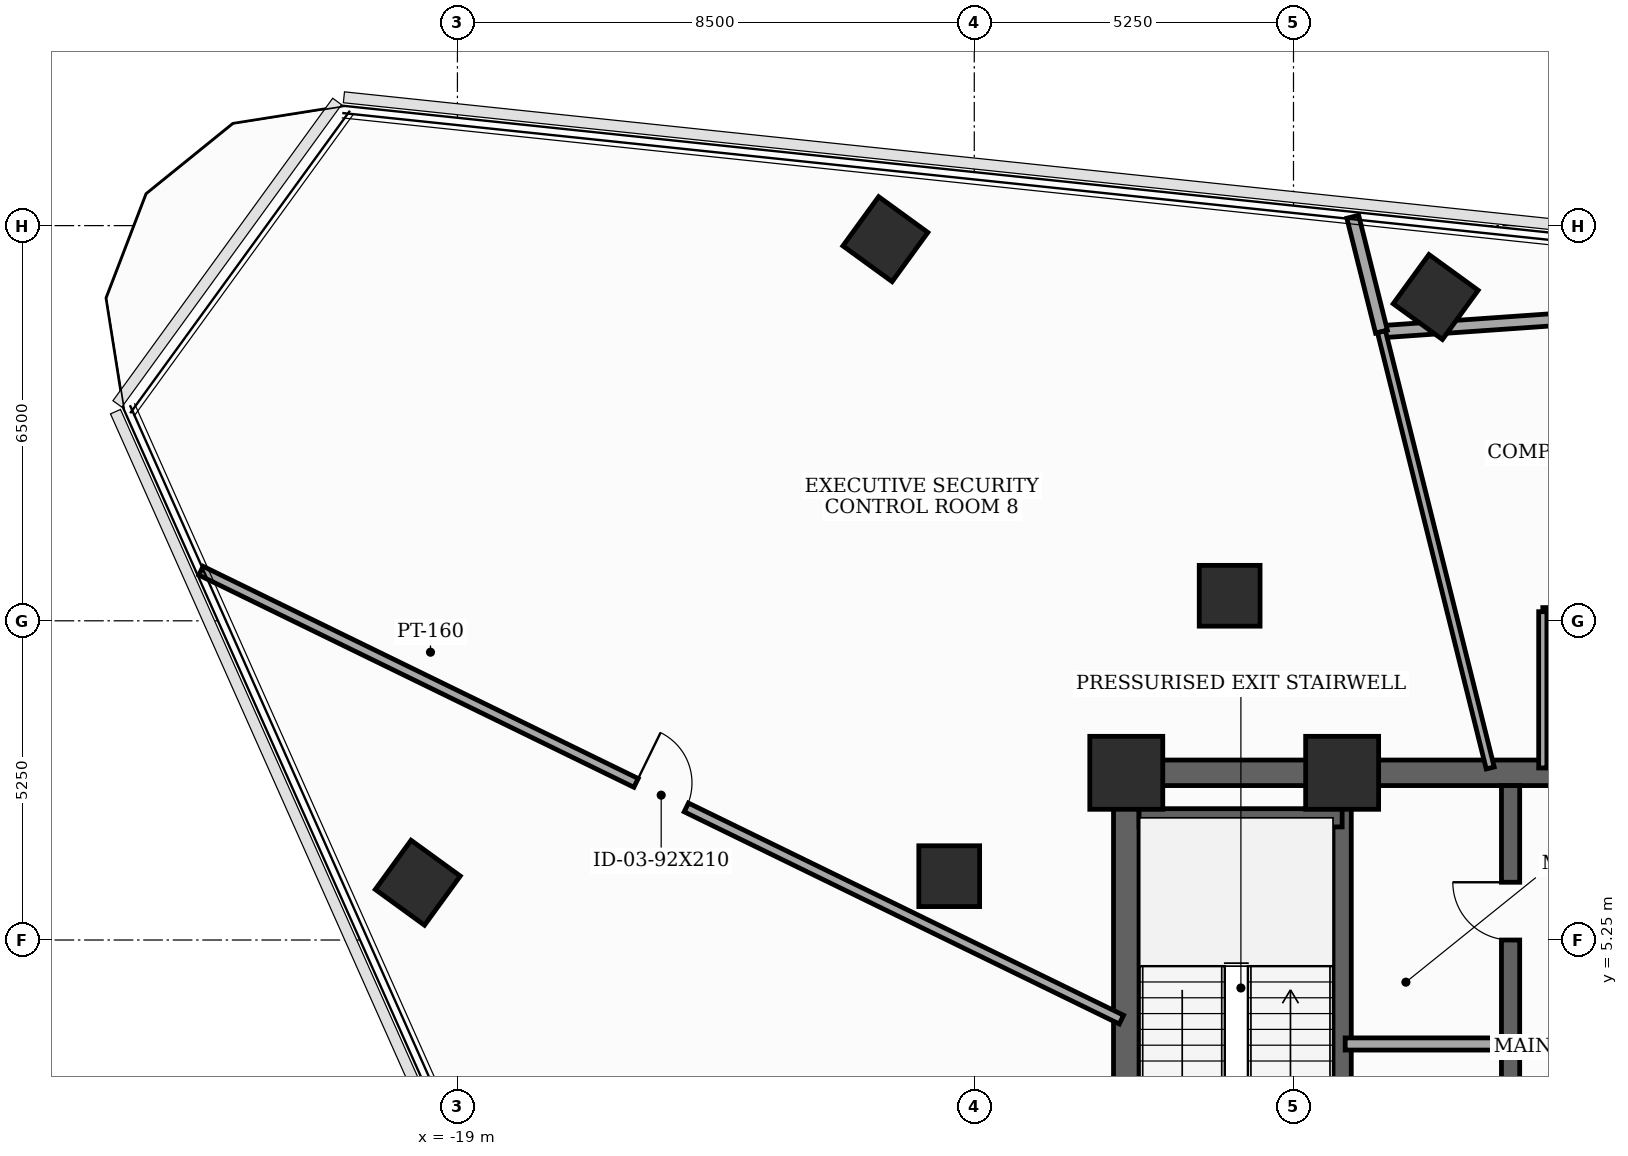
"""IFC4 building model, lengths in metres.
Left out: names, types, materials, properties, quantities, classifications, styles, units other than length and angle.
Written with IfcOpenShell. Run it as: python <this file> out.ifc"""

import sys

from ifc_helpers import new_model, si_unit, direction, frame, frame_2d, origin, origin_2d, place, context, subcontext, project, spatial, rectangle, extrude, element, fill, save


model = new_model("IFC4")
c1 = context("Model", 3, precision=1e-05, world=origin(), true_north=direction((0.0, 1.0)))
c2 = subcontext(c1, "Body", "Model", "MODEL_VIEW")
j1 = project(units=[si_unit("LENGTHUNIT", "METRE"), si_unit("PLANEANGLEUNIT", "RADIAN")], contexts=[c1])
p1 = place(None, origin())
s1 = spatial("IfcSite", under=j1, at=p1, CompositionType="ELEMENT")
p2 = place(p1, origin())
s2 = spatial("IfcBuilding", under=s1, at=p2, CompositionType="ELEMENT")
p3 = place(p2, frame((0.0, 0.0, 226.3)))
s3 = spatial("IfcBuildingStorey", under=s2, at=p3, CompositionType="ELEMENT", Elevation=226.3)
for number, where, z_axis, x_axis in (
    (1, (-4.45, 8.0, 0.0), (0.0, 0.0, 1.0), (1.0, 0.0, 0.0)),
    (2, (-8.0, 8.0, 0.0), (0.0, 0.0, 1.0), (1.0, 0.0, 0.0)),
):
    element("IfcColumn", number, at=place(p3, frame(where, z_axis=z_axis, x_axis=x_axis)), inside=s3, PredefinedType="COLUMN", context=c2, shape_type="SweptSolid", body=[
        extrude(rectangle(XDim=1.2, YDim=1.2, at=origin_2d()), origin(), (0.0, 0.0, 1.0), 3.7),
    ])
for number, where, z_axis, x_axis in (
    (3, (-6.3, 10.912, 0.0), (0.0, 0.0, 1.0), (1.0, 0.0, 0.0)),
    (4, (-10.912, 6.3, 0.0), (0.0, 0.0, 1.0), (1.0, 0.0, 0.0)),
    (5, (-2.912, 15.826, 0.0), (0.0, 0.0, 1.0), (0.588, 0.809, 0.0)),
    (6, (-11.962, 16.777, 0.0), (0.0, 0.0, 1.0), (0.588, 0.809, 0.0)),
    (7, (-19.652, 6.192, 0.0), (0.0, 0.0, 1.0), (0.588, 0.809, 0.0)),
):
    element("IfcColumn", number, at=place(p3, frame(where, z_axis=z_axis, x_axis=x_axis)), inside=s3, PredefinedType="COLUMN", context=c2, shape_type="SweptSolid", body=[
        extrude(rectangle(XDim=1.0, YDim=1.0, at=origin_2d()), origin(), (0.0, 0.0, 1.0), 3.7),
    ])
p4 = place(p3, frame((-8.0, -8.0, 0.0), z_axis=(0.0, 0.0, 1.0), x_axis=(0.0, 1.0, 0.0)))
e8 = element("IfcWall", 8, at=p4, inside=s3, PredefinedType="SHEAR", context=c2, shape_type="SweptSolid", body=[
    extrude(rectangle(XDim=16.0, YDim=0.42, at=frame_2d((8.0, 0.0))), origin(), (0.0, 0.0, 1.0), 3.5),
])
p5 = place(p4, frame((0.761, 0.0, 0.0)))
e9 = element("IfcOpeningElement", 9, at=p5, cuts=e8, PredefinedType="OPENING", context=c2, shape_type="SweptSolid", body=[
    extrude(rectangle(XDim=0.85, YDim=2.02, at=frame_2d((0.425, 1.01))), frame((0.0, 0.22, 0.0), z_axis=(0.0, -1.0, 0.0), x_axis=(1.0, 0.0, 0.0)), (0.0, 0.0, 1.0), 0.44),
])
p6 = place(p4, frame((5.35, 0.0, 0.0)))
e10 = element("IfcOpeningElement", 10, at=p6, cuts=e8, PredefinedType="OPENING", context=c2, shape_type="SweptSolid", body=[
    extrude(rectangle(XDim=1.05, YDim=2.15, at=frame_2d((0.525, 1.075))), frame((0.0, 0.22, 0.0), z_axis=(0.0, -1.0, 0.0), x_axis=(1.0, 0.0, 0.0)), (0.0, 0.0, 1.0), 0.44),
])
p7 = place(p3, frame((-8.0, 8.0, 0.0), z_axis=(0.0, 0.0, 1.0), x_axis=(1.0, 0.0, 0.0)))
e11 = element("IfcWall", 11, at=p7, inside=s3, PredefinedType="SHEAR", context=c2, shape_type="SweptSolid", body=[
    extrude(rectangle(XDim=16.0, YDim=0.42, at=frame_2d((8.0, 0.0))), origin(), (0.0, 0.0, 1.0), 3.5),
])
p8 = place(p7, frame((7.1, 0.0, 0.0)))
e12 = element("IfcOpeningElement", 12, at=p8, cuts=e11, PredefinedType="OPENING", context=c2, shape_type="SweptSolid", body=[
    extrude(rectangle(XDim=1.8, YDim=2.15, at=frame_2d((0.9, 1.075))), frame((0.0, 0.22, 0.0), z_axis=(0.0, -1.0, 0.0), x_axis=(1.0, 0.0, 0.0)), (0.0, 0.0, 1.0), 0.44),
])
p9 = place(p3, frame((-4.45, -7.79, 0.0), z_axis=(0.0, 0.0, 1.0), x_axis=(0.0, 1.0, 0.0)))
e13 = element("IfcWall", 13, at=p9, inside=s3, PredefinedType="SHEAR", context=c2, shape_type="SweptSolid", body=[
    extrude(rectangle(XDim=15.58, YDim=0.3, at=frame_2d((7.79, 0.0))), origin(), (0.0, 0.0, 1.0), 3.5),
])
p10 = place(p3, frame((-7.79, 7.26, 0.0), z_axis=(0.0, 0.0, 1.0), x_axis=(1.0, 0.0, 0.0)))
e14 = element("IfcWall", 14, at=p10, inside=s3, PredefinedType="SHEAR", context=c2, shape_type="SweptSolid", body=[
    extrude(rectangle(XDim=3.34, YDim=0.3, at=frame_2d((1.67, 0.0))), origin(), (0.0, 0.0, 1.0), 3.5),
])
p11 = place(p3, frame((-1.68, -4.85, 0.0), z_axis=(0.0, 0.0, 1.0), x_axis=(0.0, 1.0, 0.0)))
e15 = element("IfcWall", 15, at=p11, inside=s3, PredefinedType="SHEAR", context=c2, shape_type="SweptSolid", body=[
    extrude(rectangle(XDim=12.64, YDim=0.3, at=frame_2d((6.32, 0.0))), origin(), (0.0, 0.0, 1.0), 3.5),
])
p12 = place(p11, frame((1.65, 0.0, 0.0)))
e16 = element("IfcOpeningElement", 16, at=p12, cuts=e15, PredefinedType="OPENING", context=c2, shape_type="SweptSolid", body=[
    extrude(rectangle(XDim=0.95, YDim=2.1, at=frame_2d((0.475, 1.05))), frame((0.0, 0.16, 0.0), z_axis=(0.0, -1.0, 0.0), x_axis=(1.0, 0.0, 0.0)), (0.0, 0.0, 1.0), 0.32),
])
p13 = place(p11, frame((5.9, 0.0, 0.0)))
e17 = element("IfcOpeningElement", 17, at=p13, cuts=e15, PredefinedType="OPENING", context=c2, shape_type="SweptSolid", body=[
    extrude(rectangle(XDim=0.95, YDim=2.1, at=frame_2d((0.475, 1.05))), frame((0.0, 0.16, 0.0), z_axis=(0.0, -1.0, 0.0), x_axis=(1.0, 0.0, 0.0)), (0.0, 0.0, 1.0), 0.32),
])
p14 = place(p11, frame((10.1, 0.0, 0.0)))
e18 = element("IfcOpeningElement", 18, at=p14, cuts=e15, PredefinedType="OPENING", context=c2, shape_type="SweptSolid", body=[
    extrude(rectangle(XDim=0.95, YDim=2.1, at=frame_2d((0.475, 1.05))), frame((0.0, 0.16, 0.0), z_axis=(0.0, -1.0, 0.0), x_axis=(1.0, 0.0, 0.0)), (0.0, 0.0, 1.0), 0.32),
])
p15 = place(p3, frame((-4.4, 3.54, 0.0), z_axis=(0.0, 0.0, 1.0), x_axis=(1.0, 0.0, 0.0)))
e19 = element("IfcWall", 19, at=p15, inside=s3, PredefinedType="SOLIDWALL", context=c2, shape_type="SweptSolid", body=[
    extrude(rectangle(XDim=2.68, YDim=0.2, at=frame_2d((1.34, 0.0))), origin(), (0.0, 0.0, 1.0), 3.5),
])
p16 = place(p3, frame((10.15, 10.65, 0.0), z_axis=(0.0, 0.0, 1.0), x_axis=(-1.0, 0.0, 0.0)))
e20 = element("IfcWall", 20, at=p16, inside=s3, PredefinedType="PARTITIONING", context=c2, shape_type="SweptSolid", body=[
    extrude(rectangle(XDim=11.3, YDim=0.135, at=frame_2d((5.65, 0.0))), origin(), (0.0, 0.0, 1.0), 2.885),
])
p17 = place(p16, frame((6.531, 0.0, 0.0)))
e21 = element("IfcOpeningElement", 21, at=p17, cuts=e20, PredefinedType="OPENING", context=c2, shape_type="SweptSolid", body=[
    extrude(rectangle(XDim=0.95, YDim=2.1, at=frame_2d((0.475, 1.05))), frame((0.0, 0.077, 0.0), z_axis=(0.0, -1.0, 0.0), x_axis=(1.0, 0.0, 0.0)), (0.0, 0.0, 1.0), 0.155),
])
p18 = place(p3, frame((-1.15, 10.65, 0.0), z_axis=(0.0, 0.0, 1.0), x_axis=(0.0, -1.0, 0.0)))
e22 = element("IfcWall", 22, at=p18, inside=s3, PredefinedType="PARTITIONING", context=c2, shape_type="SweptSolid", body=[
    extrude(rectangle(XDim=2.57, YDim=0.135, at=frame_2d((1.285, 0.0))), origin(), (0.0, 0.0, 1.0), 2.885),
])
p19 = place(p3, frame((-3.803, 15.255, 0.0), z_axis=(0.0, 0.0, 1.0), x_axis=(0.997563622011, 0.069762597718, 0.0)))
e23 = element("IfcWall", 23, at=p19, inside=s3, PredefinedType="SOLIDWALL", context=c2, shape_type="SweptSolid", body=[
    extrude(rectangle(XDim=5.879, YDim=0.2, at=frame_2d((2.94, 0.0))), origin(), (0.0, 0.0, 1.0), 2.985),
])
p20 = place(p3, frame((-4.275, 17.146, 0.0), z_axis=(0.0, 0.0, 1.0), x_axis=(0.242417712213, -0.970171970738, 0.0)))
e24 = element("IfcWall", 24, at=p20, inside=s3, PredefinedType="SOLIDWALL", context=c2, shape_type="SweptSolid", body=[
    extrude(rectangle(XDim=1.949, YDim=0.2, at=frame_2d((0.974, 0.0))), origin(), (0.0, 0.0, 1.0), 3.035),
])
p21 = place(p3, frame((-3.803, 15.255, 0.0), z_axis=(0.0, 0.0, 1.0), x_axis=(0.241851911951, -0.970313172479, 0.0)))
e25 = element("IfcWall", 25, at=p21, inside=s3, PredefinedType="PARTITIONING", context=c2, shape_type="SweptSolid", body=[
    extrude(rectangle(XDim=7.394, YDim=0.135, at=frame_2d((3.697, 0.0))), origin(), (0.0, 0.0, 1.0), 2.885),
])
p22 = place(p3, frame((-23.218, 11.324, 0.0), z_axis=(0.0, 0.0, 1.0), x_axis=(0.898787530524, -0.438384505856, 0.0)))
e26 = element("IfcWall", 26, at=p22, inside=s3, PredefinedType="PARTITIONING", context=c2, shape_type="SweptSolid", body=[
    extrude(rectangle(XDim=16.843, YDim=0.16, at=frame_2d((8.421, 0.0))), origin(), (0.0, 0.0, 1.0), 2.885),
])
p23 = place(p22, frame((7.961, 0.0, 0.0)))
e27 = element("IfcOpeningElement", 27, at=p23, cuts=e26, PredefinedType="OPENING", context=c2, shape_type="SweptSolid", body=[
    extrude(rectangle(XDim=0.92, YDim=2.1, at=frame_2d((0.46, 1.05))), frame((0.0, 0.09, 0.0), z_axis=(0.0, -1.0, 0.0), x_axis=(1.0, 0.0, 0.0)), (0.0, 0.0, 1.0), 0.18),
])
p24 = place(p14, origin())
e28 = element("IfcDoor", 28, at=p24, inside=s3, OperationType="SINGLE_SWING_RIGHT", PredefinedType="DOOR", context=c2, shape_type="SweptSolid", body=[
    extrude(rectangle(XDim=0.95, YDim=2.1, at=frame_2d((0.475, 1.05))), frame((0.0, 0.025, 0.0), z_axis=(0.0, -1.0, 0.0), x_axis=(1.0, 0.0, 0.0)), (0.0, 0.0, 1.0), 0.05),
])
fill(e18, e28)
p25 = place(p23, origin())
e29 = element("IfcDoor", 29, at=p25, inside=s3, OperationType="SINGLE_SWING_LEFT", PredefinedType="DOOR", context=c2, shape_type="SweptSolid", body=[
    extrude(rectangle(XDim=0.92, YDim=2.1, at=frame_2d((0.46, 1.05))), frame((0.0, 0.025, 0.0), z_axis=(0.0, -1.0, 0.0), x_axis=(1.0, 0.0, 0.0)), (0.0, 0.0, 1.0), 0.05),
])
fill(e27, e29)
save(model, sys.argv[1])
